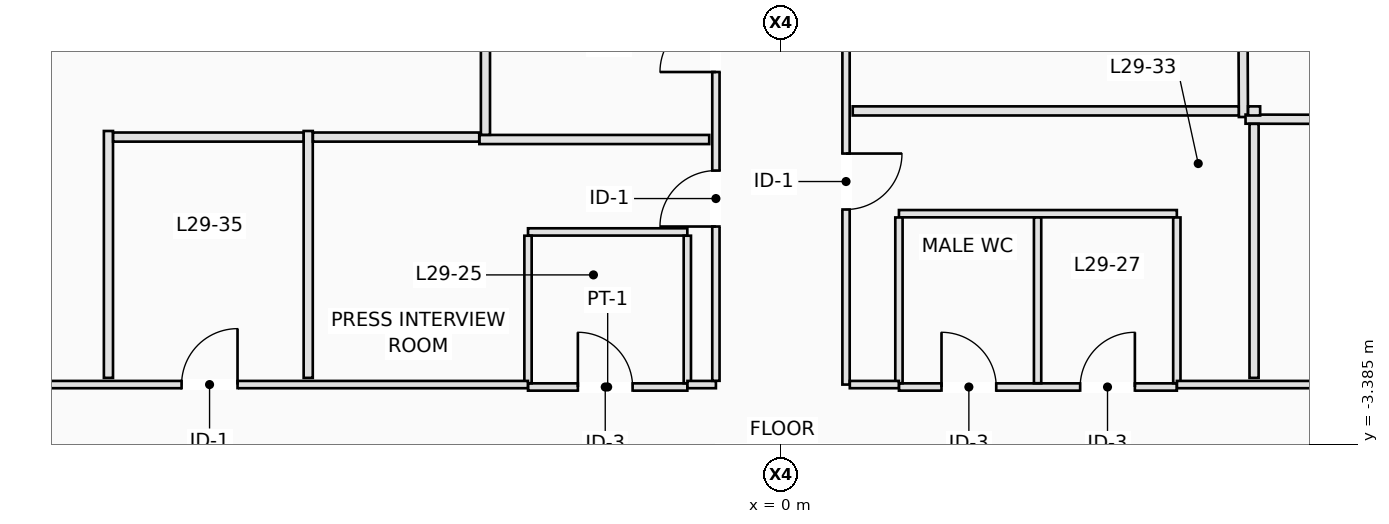
"""IFC4 building model, lengths in metres.
Left out: names, types, materials, properties, quantities, classifications, styles, units other than length and angle.
Written with IfcOpenShell. Run it as: python <this file> out.ifc"""

import sys

from ifc_helpers import new_model, si_unit, direction, frame, frame_2d, origin, place, context, subcontext, project, spatial, rectangle, extrude, element, fill, save


model = new_model("IFC4")
c1 = context("Model", 3, precision=1e-05, world=origin(), true_north=direction((0.0, 1.0)))
c2 = subcontext(c1, "Body", "Model", "MODEL_VIEW")
j1 = project(units=[si_unit("LENGTHUNIT", "METRE"), si_unit("PLANEANGLEUNIT", "RADIAN")], contexts=[c1])
p1 = place(None, origin())
s1 = spatial("IfcSite", under=j1, at=p1, CompositionType="ELEMENT")
p2 = place(p1, origin())
s2 = spatial("IfcBuilding", under=s1, at=p2, CompositionType="ELEMENT")
p3 = place(p2, frame((0.0, 0.0, 109.0)))
s3 = spatial("IfcBuildingStorey", under=s2, at=p3, CompositionType="ELEMENT", Elevation=109.0)
p4 = place(p3, frame((-4.16, -2.44, 0.0), z_axis=(0.0, 0.0, 1.0), x_axis=(1.0, 0.0, 0.0)))
e1 = element("IfcWall", 1, at=p4, inside=s3, PredefinedType="PARTITIONING", context=c2, shape_type="SweptSolid", body=[
    extrude(rectangle(XDim=2.62, YDim=0.12, at=frame_2d((1.31, 0.0))), origin(), (0.0, 0.0, 1.0), 3.25),
])
p5 = place(p4, frame((0.82, 0.0, 0.0)))
e2 = element("IfcOpeningElement", 2, at=p5, cuts=e1, PredefinedType="OPENING", context=c2, shape_type="SweptSolid", body=[
    extrude(rectangle(XDim=0.9, YDim=2.12, at=frame_2d((0.45, 1.06))), frame((0.0, 0.07, 0.0), z_axis=(0.0, -1.0, 0.0), x_axis=(1.0, 0.0, 0.0)), (0.0, 0.0, 1.0), 0.14),
])
p6 = place(p3, frame((-4.16, 0.11, 0.0), z_axis=(0.0, 0.0, 1.0), x_axis=(1.0, 0.0, 0.0)))
e3 = element("IfcWall", 3, at=p6, inside=s3, PredefinedType="PARTITIONING", context=c2, shape_type="SweptSolid", body=[
    extrude(rectangle(XDim=2.62, YDim=0.12, at=frame_2d((1.31, 0.0))), origin(), (0.0, 0.0, 1.0), 2.891),
])
p7 = place(p3, frame((-4.16, -2.378, 0.0), z_axis=(0.0, 0.0, 1.0), x_axis=(0.0, 1.0, 0.0)))
e4 = element("IfcWall", 4, at=p7, inside=s3, PredefinedType="PARTITIONING", context=c2, shape_type="SweptSolid", body=[
    extrude(rectangle(XDim=2.426, YDim=0.12, at=frame_2d((1.213, 0.0))), origin(), (0.0, 0.0, 1.0), 2.648),
])
p8 = place(p3, frame((-1.54, -2.378, 0.0), z_axis=(0.0, 0.0, 1.0), x_axis=(0.0, 1.0, 0.0)))
e5 = element("IfcWall", 5, at=p8, inside=s3, PredefinedType="PARTITIONING", context=c2, shape_type="SweptSolid", body=[
    extrude(rectangle(XDim=2.426, YDim=0.12, at=frame_2d((1.213, 0.0))), origin(), (0.0, 0.0, 1.0), 3.25),
])
p9 = place(p3, frame((1.94, -2.44, 0.0), z_axis=(0.0, 0.0, 1.0), x_axis=(1.0, 0.0, 0.0)))
e6 = element("IfcWall", 6, at=p9, inside=s3, PredefinedType="PARTITIONING", context=c2, shape_type="SweptSolid", body=[
    extrude(rectangle(XDim=4.57, YDim=0.12, at=frame_2d((2.285, 0.0))), origin(), (0.0, 0.0, 1.0), 3.25),
])
p10 = place(p9, frame((0.7, 0.0, 0.0)))
e7 = element("IfcOpeningElement", 7, at=p10, cuts=e6, PredefinedType="OPENING", context=c2, shape_type="SweptSolid", body=[
    extrude(rectangle(XDim=0.9, YDim=2.12, at=frame_2d((0.45, 1.06))), frame((0.0, 0.07, 0.0), z_axis=(0.0, -1.0, 0.0), x_axis=(1.0, 0.0, 0.0)), (0.0, 0.0, 1.0), 0.14),
])
p11 = place(p9, frame((2.98, 0.0, 0.0)))
e8 = element("IfcOpeningElement", 8, at=p11, cuts=e6, PredefinedType="OPENING", context=c2, shape_type="SweptSolid", body=[
    extrude(rectangle(XDim=0.9, YDim=2.12, at=frame_2d((0.45, 1.06))), frame((0.0, 0.07, 0.0), z_axis=(0.0, -1.0, 0.0), x_axis=(1.0, 0.0, 0.0)), (0.0, 0.0, 1.0), 0.14),
])
p12 = place(p3, frame((1.94, 0.41, 0.0), z_axis=(0.0, 0.0, 1.0), x_axis=(1.0, 0.0, 0.0)))
e9 = element("IfcWall", 9, at=p12, inside=s3, PredefinedType="PARTITIONING", context=c2, shape_type="SweptSolid", body=[
    extrude(rectangle(XDim=4.57, YDim=0.12, at=frame_2d((2.285, 0.0))), origin(), (0.0, 0.0, 1.0), 3.25),
])
p13 = place(p3, frame((1.94, -2.378, 0.0), z_axis=(0.0, 0.0, 1.0), x_axis=(0.0, 1.0, 0.0)))
e10 = element("IfcWall", 10, at=p13, inside=s3, PredefinedType="PARTITIONING", context=c2, shape_type="SweptSolid", body=[
    extrude(rectangle(XDim=2.726, YDim=0.12, at=frame_2d((1.363, 0.0))), origin(), (0.0, 0.0, 1.0), 3.25),
])
p14 = place(p3, frame((4.22, -2.378, 0.0), z_axis=(0.0, 0.0, 1.0), x_axis=(0.0, 1.0, 0.0)))
e11 = element("IfcWall", 11, at=p14, inside=s3, PredefinedType="PARTITIONING", context=c2, shape_type="SweptSolid", body=[
    extrude(rectangle(XDim=2.726, YDim=0.12, at=frame_2d((1.363, 0.0))), origin(), (0.0, 0.0, 1.0), 2.648),
])
p15 = place(p3, frame((6.51, -2.378, 0.0), z_axis=(0.0, 0.0, 1.0), x_axis=(0.0, 1.0, 0.0)))
e12 = element("IfcWall", 12, at=p15, inside=s3, PredefinedType="PARTITIONING", context=c2, shape_type="SweptSolid", body=[
    extrude(rectangle(XDim=2.726, YDim=0.12, at=frame_2d((1.363, 0.0))), origin(), (0.0, 0.0, 1.0), 3.25),
])
p16 = place(p3, frame((-12.348, -2.4, 0.0), z_axis=(0.0, 0.0, 1.0), x_axis=(1.0, 0.0, 0.0)))
e13 = element("IfcWall", 13, at=p16, inside=s3, PredefinedType="PARTITIONING", context=c2, shape_type="SweptSolid", body=[
    extrude(rectangle(XDim=8.186, YDim=0.12, at=frame_2d((4.093, 0.0))), origin(), (0.0, 0.0, 1.0), 3.25),
])
p17 = place(p16, frame((2.491, 0.0, 0.0)))
e14 = element("IfcOpeningElement", 14, at=p17, cuts=e13, PredefinedType="OPENING", context=c2, shape_type="SweptSolid", body=[
    extrude(rectangle(XDim=0.92, YDim=2.12, at=frame_2d((0.46, 1.06))), frame((0.0, 0.07, 0.0), z_axis=(0.0, -1.0, 0.0), x_axis=(1.0, 0.0, 0.0)), (0.0, 0.0, 1.0), 0.14),
])
p18 = place(p3, frame((-1.538, -2.4, 0.0), z_axis=(0.0, 0.0, 1.0), x_axis=(1.0, 0.0, 0.0)))
e15 = element("IfcWall", 15, at=p18, inside=s3, PredefinedType="PARTITIONING", context=c2, shape_type="SweptSolid", body=[
    extrude(rectangle(XDim=0.468, YDim=0.12, at=frame_2d((0.234, 0.0))), origin(), (0.0, 0.0, 1.0), 3.25),
])
p19 = place(p3, frame((-1.07, -2.338, 0.0), z_axis=(0.0, 0.0, 1.0), x_axis=(0.0, 1.0, 0.0)))
e16 = element("IfcWall", 16, at=p19, inside=s3, PredefinedType="PARTITIONING", context=c2, shape_type="SweptSolid", body=[
    extrude(rectangle(XDim=13.188, YDim=0.12, at=frame_2d((6.594, 0.0))), origin(), (0.0, 0.0, 1.0), 3.25),
])
p20 = place(p19, frame((9.559, 0.0, 0.0)))
e17 = element("IfcOpeningElement", 17, at=p20, cuts=e16, PredefinedType="OPENING", context=c2, shape_type="SweptSolid", body=[
    extrude(rectangle(XDim=0.92, YDim=2.12, at=frame_2d((0.46, 1.06))), frame((0.0, 0.07, 0.0), z_axis=(0.0, -1.0, 0.0), x_axis=(1.0, 0.0, 0.0)), (0.0, 0.0, 1.0), 0.14),
])
p21 = place(p19, frame((5.078, 0.0, 0.0)))
e18 = element("IfcOpeningElement", 18, at=p21, cuts=e16, PredefinedType="OPENING", context=c2, shape_type="SweptSolid", body=[
    extrude(rectangle(XDim=0.92, YDim=2.12, at=frame_2d((0.46, 1.06))), frame((0.0, 0.07, 0.0), z_axis=(0.0, -1.0, 0.0), x_axis=(1.0, 0.0, 0.0)), (0.0, 0.0, 1.0), 0.14),
])
p22 = place(p19, frame((2.537, 0.0, 0.0)))
e19 = element("IfcOpeningElement", 19, at=p22, cuts=e16, PredefinedType="OPENING", context=c2, shape_type="SweptSolid", body=[
    extrude(rectangle(XDim=0.92, YDim=2.12, at=frame_2d((0.46, 1.06))), frame((0.0, 0.07, 0.0), z_axis=(0.0, -1.0, 0.0), x_axis=(1.0, 0.0, 0.0)), (0.0, 0.0, 1.0), 0.14),
])
p23 = place(p3, frame((1.07, 10.788, 0.0), z_axis=(0.0, 0.0, 1.0), x_axis=(0.0, -1.0, 0.0)))
e20 = element("IfcWall", 20, at=p23, inside=s3, PredefinedType="PARTITIONING", context=c2, shape_type="SweptSolid", body=[
    extrude(rectangle(XDim=13.188, YDim=0.12, at=frame_2d((6.594, 0.0))), origin(), (0.0, 0.0, 1.0), 3.25),
])
p24 = place(p23, frame((3.408, 0.0, 0.0)))
e21 = element("IfcOpeningElement", 21, at=p24, cuts=e20, PredefinedType="OPENING", context=c2, shape_type="SweptSolid", body=[
    extrude(rectangle(XDim=0.92, YDim=2.12, at=frame_2d((0.46, 1.06))), frame((0.0, 0.07, 0.0), z_axis=(0.0, -1.0, 0.0), x_axis=(1.0, 0.0, 0.0)), (0.0, 0.0, 1.0), 0.14),
])
p25 = place(p23, frame((6.608, 0.0, 0.0)))
e22 = element("IfcOpeningElement", 22, at=p25, cuts=e20, PredefinedType="OPENING", context=c2, shape_type="SweptSolid", body=[
    extrude(rectangle(XDim=0.92, YDim=2.12, at=frame_2d((0.46, 1.06))), frame((0.0, 0.07, 0.0), z_axis=(0.0, -1.0, 0.0), x_axis=(1.0, 0.0, 0.0)), (0.0, 0.0, 1.0), 0.14),
])
p26 = place(p23, frame((9.389, 0.0, 0.0)))
e23 = element("IfcOpeningElement", 23, at=p26, cuts=e20, PredefinedType="OPENING", context=c2, shape_type="SweptSolid", body=[
    extrude(rectangle(XDim=0.92, YDim=2.12, at=frame_2d((0.46, 1.06))), frame((0.0, 0.07, 0.0), z_axis=(0.0, -1.0, 0.0), x_axis=(1.0, 0.0, 0.0)), (0.0, 0.0, 1.0), 0.14),
])
p27 = place(p3, frame((1.132, -2.4, 0.0), z_axis=(0.0, 0.0, 1.0), x_axis=(1.0, 0.0, 0.0)))
e24 = element("IfcWall", 24, at=p27, inside=s3, PredefinedType="PARTITIONING", context=c2, shape_type="SweptSolid", body=[
    extrude(rectangle(XDim=0.806, YDim=0.12, at=frame_2d((0.403, 0.0))), origin(), (0.0, 0.0, 1.0), 3.25),
])
p28 = place(p3, frame((6.512, -2.4, 0.0), z_axis=(0.0, 0.0, 1.0), x_axis=(1.0, 0.0, 0.0)))
e25 = element("IfcWall", 25, at=p28, inside=s3, PredefinedType="PARTITIONING", context=c2, shape_type="SweptSolid", body=[
    extrude(rectangle(XDim=5.898, YDim=0.12, at=frame_2d((2.949, 0.0))), origin(), (0.0, 0.0, 1.0), 3.25),
])
p29 = place(p28, frame((2.994, 0.0, 0.0)))
e26 = element("IfcOpeningElement", 26, at=p29, cuts=e25, PredefinedType="OPENING", context=c2, shape_type="SweptSolid", body=[
    extrude(rectangle(XDim=0.92, YDim=2.12, at=frame_2d((0.46, 1.06))), frame((0.0, 0.07, 0.0), z_axis=(0.0, -1.0, 0.0), x_axis=(1.0, 0.0, 0.0)), (0.0, 0.0, 1.0), 0.14),
])
p30 = place(p3, frame((7.605, 2.0, 0.0), z_axis=(0.0, 0.0, 1.0), x_axis=(-0.004427775513, 0.999990197354, 0.0)))
e27 = element("IfcWall", 27, at=p30, inside=s3, PredefinedType="PARTITIONING", context=c2, shape_type="SweptSolid", body=[
    extrude(rectangle(XDim=3.198, YDim=0.15, at=frame_2d((1.599, 0.0))), origin(), (0.0, 0.0, 1.0), 3.25),
])
p31 = place(p3, frame((15.657, 1.95, 0.0), z_axis=(0.0, 0.0, 1.0), x_axis=(-0.999998274553, 0.001857657361, 0.0)))
e28 = element("IfcWall", 28, at=p31, inside=s3, PredefinedType="PARTITIONING", context=c2, shape_type="SweptSolid", body=[
    extrude(rectangle(XDim=8.017, YDim=0.15, at=frame_2d((4.008, 0.0))), origin(), (0.0, 0.0, 1.0), 3.25),
])
p32 = place(p3, frame((7.88, 2.1, 0.0), z_axis=(0.0, 0.0, 1.0), x_axis=(-1.0, 0.0, 0.0)))
e29 = element("IfcWall", 29, at=p32, inside=s3, PredefinedType="PARTITIONING", context=c2, shape_type="SweptSolid", body=[
    extrude(rectangle(XDim=0.198, YDim=0.15, at=frame_2d((0.099, 0.0))), origin(), (0.0, 0.0, 1.0), 3.25),
])
p33 = place(p3, frame((7.528, 2.1, 0.0), z_axis=(0.0, 0.0, 1.0), x_axis=(-1.0, 0.0, 0.0)))
e30 = element("IfcWall", 30, at=p33, inside=s3, PredefinedType="PARTITIONING", context=c2, shape_type="SweptSolid", body=[
    extrude(rectangle(XDim=6.348, YDim=0.15, at=frame_2d((3.174, 0.0))), origin(), (0.0, 0.0, 1.0), 3.25),
])
p34 = place(p3, frame((-1.18, 1.63, 0.0), z_axis=(0.0, 0.0, 1.0), x_axis=(-1.0, 0.0, 0.0)))
e31 = element("IfcWall", 31, at=p34, inside=s3, PredefinedType="PARTITIONING", context=c2, shape_type="SweptSolid", body=[
    extrude(rectangle(XDim=3.78, YDim=0.15, at=frame_2d((1.89, 0.0))), origin(), (0.0, 0.0, 1.0), 3.25),
])
p35 = place(p3, frame((-4.86, 1.707, 0.0), z_axis=(0.0, 0.0, 1.0), x_axis=(0.0, 1.0, 0.0)))
e32 = element("IfcWall", 32, at=p35, inside=s3, PredefinedType="PARTITIONING", context=c2, shape_type="SweptSolid", body=[
    extrude(rectangle(XDim=2.946, YDim=0.15, at=frame_2d((1.473, 0.0))), origin(), (0.0, 0.0, 1.0), 3.25),
])
p36 = place(p3, frame((7.78, 1.887, 0.0), z_axis=(0.0, 0.0, 1.0), x_axis=(0.0, -1.0, 0.0)))
e33 = element("IfcWall", 33, at=p36, inside=s3, PredefinedType="PARTITIONING", context=c2, shape_type="SweptSolid", body=[
    extrude(rectangle(XDim=4.177, YDim=0.15, at=frame_2d((2.089, 0.0))), origin(), (0.0, 0.0, 1.0), 3.25),
])
p37 = place(p3, frame((-7.775, -2.29, 0.0), z_axis=(0.0, 0.0, 1.0), x_axis=(0.0, 1.0, 0.0)))
e34 = element("IfcWall", 34, at=p37, inside=s3, PredefinedType="PARTITIONING", context=c2, shape_type="SweptSolid", body=[
    extrude(rectangle(XDim=4.06, YDim=0.15, at=frame_2d((2.03, 0.0))), origin(), (0.0, 0.0, 1.0), 3.25),
])
p38 = place(p3, frame((-7.698, 1.67, 0.0), z_axis=(0.0, 0.0, 1.0), x_axis=(1.0, 0.0, 0.0)))
e35 = element("IfcWall", 35, at=p38, inside=s3, PredefinedType="PARTITIONING", context=c2, shape_type="SweptSolid", body=[
    extrude(rectangle(XDim=2.736, YDim=0.15, at=frame_2d((1.368, 0.0))), origin(), (0.0, 0.0, 1.0), 3.25),
])
p39 = place(p3, frame((-11.06, -2.29, 0.0), z_axis=(0.0, 0.0, 1.0), x_axis=(0.0, 1.0, 0.0)))
e36 = element("IfcWall", 36, at=p39, inside=s3, PredefinedType="PARTITIONING", context=c2, shape_type="SweptSolid", body=[
    extrude(rectangle(XDim=4.06, YDim=0.15, at=frame_2d((2.03, 0.0))), origin(), (0.0, 0.0, 1.0), 3.25),
])
p40 = place(p3, frame((-10.983, 1.67, 0.0), z_axis=(0.0, 0.0, 1.0), x_axis=(1.0, 0.0, 0.0)))
e37 = element("IfcWall", 37, at=p40, inside=s3, PredefinedType="PARTITIONING", context=c2, shape_type="SweptSolid", body=[
    extrude(rectangle(XDim=3.131, YDim=0.15, at=frame_2d((1.565, 0.0))), origin(), (0.0, 0.0, 1.0), 3.25),
])
p41 = place(p5, origin())
e38 = element("IfcDoor", 38, at=p41, inside=s3, OperationType="SINGLE_SWING_LEFT", PredefinedType="DOOR", context=c2, shape_type="SweptSolid", body=[
    extrude(rectangle(XDim=0.9, YDim=2.12, at=frame_2d((0.45, 1.06))), frame((0.0, 0.025, 0.0), z_axis=(0.0, -1.0, 0.0), x_axis=(1.0, 0.0, 0.0)), (0.0, 0.0, 1.0), 0.05),
])
fill(e2, e38)
p42 = place(p10, origin())
e39 = element("IfcDoor", 39, at=p42, inside=s3, OperationType="SINGLE_SWING_LEFT", PredefinedType="DOOR", context=c2, shape_type="SweptSolid", body=[
    extrude(rectangle(XDim=0.9, YDim=2.12, at=frame_2d((0.45, 1.06))), frame((0.0, 0.025, 0.0), z_axis=(0.0, -1.0, 0.0), x_axis=(1.0, 0.0, 0.0)), (0.0, 0.0, 1.0), 0.05),
])
fill(e7, e39)
p43 = place(p11, origin())
e40 = element("IfcDoor", 40, at=p43, inside=s3, OperationType="SINGLE_SWING_RIGHT", PredefinedType="DOOR", context=c2, shape_type="SweptSolid", body=[
    extrude(rectangle(XDim=0.9, YDim=2.12, at=frame_2d((0.45, 1.06))), frame((0.0, 0.025, 0.0), z_axis=(0.0, -1.0, 0.0), x_axis=(1.0, 0.0, 0.0)), (0.0, 0.0, 1.0), 0.05),
])
fill(e8, e40)
p44 = place(p21, origin())
e41 = element("IfcDoor", 41, at=p44, inside=s3, OperationType="SINGLE_SWING_LEFT", PredefinedType="DOOR", context=c2, shape_type="SweptSolid", body=[
    extrude(rectangle(XDim=0.92, YDim=2.12, at=frame_2d((0.46, 1.06))), frame((0.0, 0.025, 0.0), z_axis=(0.0, -1.0, 0.0), x_axis=(1.0, 0.0, 0.0)), (0.0, 0.0, 1.0), 0.05),
])
fill(e18, e41)
p45 = place(p26, origin())
e42 = element("IfcDoor", 42, at=p45, inside=s3, OperationType="SINGLE_SWING_LEFT", PredefinedType="DOOR", context=c2, shape_type="SweptSolid", body=[
    extrude(rectangle(XDim=0.92, YDim=2.12, at=frame_2d((0.46, 1.06))), frame((0.0, 0.025, 0.0), z_axis=(0.0, -1.0, 0.0), x_axis=(1.0, 0.0, 0.0)), (0.0, 0.0, 1.0), 0.05),
])
fill(e23, e42)
p46 = place(p22, origin())
e43 = element("IfcDoor", 43, at=p46, inside=s3, OperationType="SINGLE_SWING_LEFT", PredefinedType="DOOR", context=c2, shape_type="SweptSolid", body=[
    extrude(rectangle(XDim=0.92, YDim=2.12, at=frame_2d((0.46, 1.06))), frame((0.0, 0.025, 0.0), z_axis=(0.0, -1.0, 0.0), x_axis=(1.0, 0.0, 0.0)), (0.0, 0.0, 1.0), 0.05),
])
fill(e19, e43)
p47 = place(p17, origin())
e44 = element("IfcDoor", 44, at=p47, inside=s3, OperationType="SINGLE_SWING_RIGHT", PredefinedType="DOOR", context=c2, shape_type="SweptSolid", body=[
    extrude(rectangle(XDim=0.92, YDim=2.12, at=frame_2d((0.46, 1.06))), frame((0.0, 0.025, 0.0), z_axis=(0.0, -1.0, 0.0), x_axis=(1.0, 0.0, 0.0)), (0.0, 0.0, 1.0), 0.05),
])
fill(e14, e44)
save(model, sys.argv[1])
